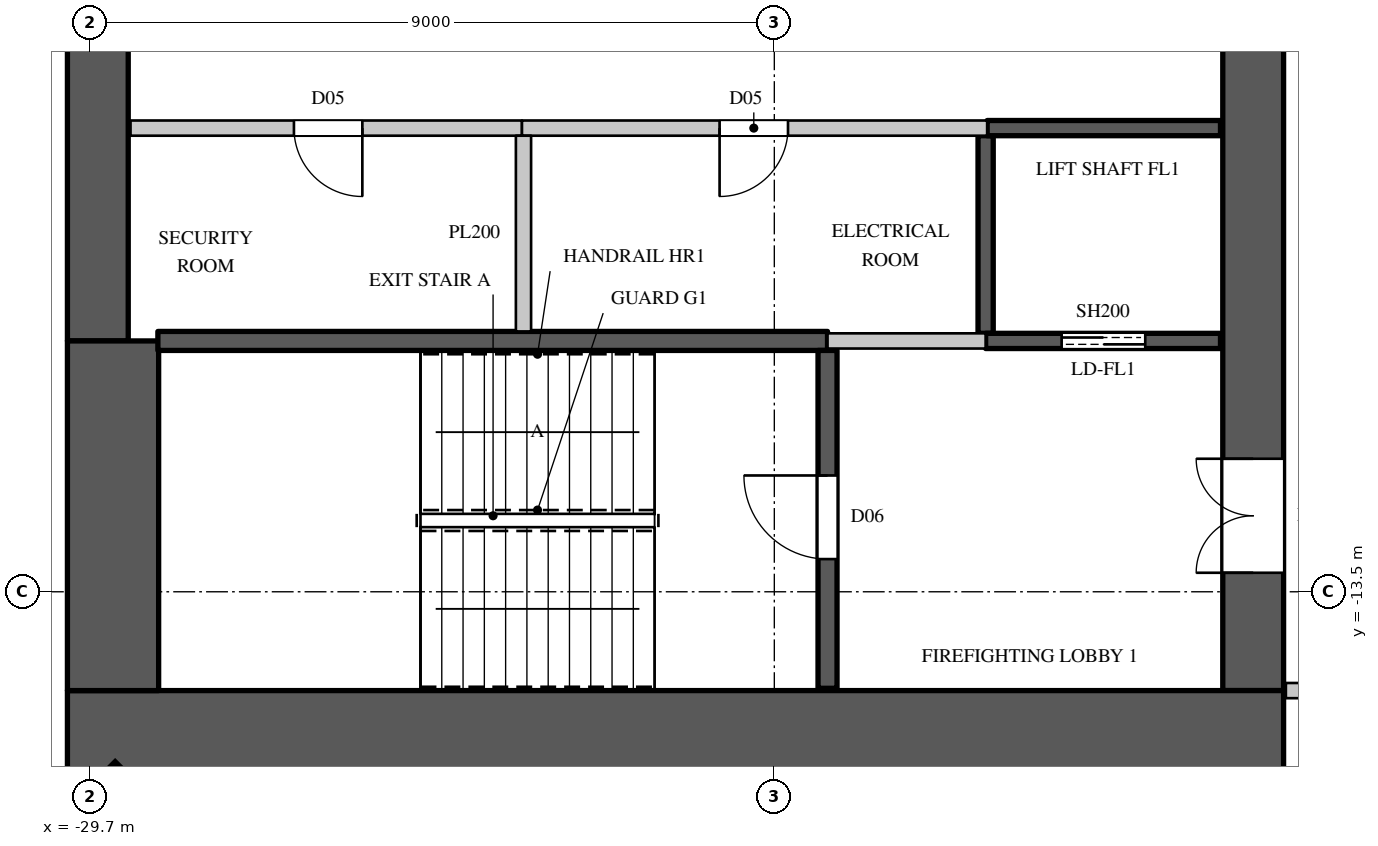
"""IFC4 building model, lengths in metres.
Left out: names, types, materials, properties, quantities, classifications, styles, units other than length and angle.
Written with IfcOpenShell. Run it as: python <this file> out.ifc"""

import sys

from ifc_helpers import new_model, si_unit, direction, frame, frame_2d, origin, origin_2d, place, context, subcontext, project, spatial, rectangle, extrude, element, fill, save


model = new_model("IFC4")
c1 = context("Model", 3, precision=1e-05, world=origin(), true_north=direction((0.0, 1.0)))
c2 = subcontext(c1, "Body", "Model", "MODEL_VIEW")
j1 = project(units=[si_unit("LENGTHUNIT", "METRE"), si_unit("PLANEANGLEUNIT", "RADIAN")], contexts=[c1])
p1 = place(None, origin())
s1 = spatial("IfcSite", under=j1, at=p1, CompositionType="ELEMENT")
p2 = place(p1, origin())
s2 = spatial("IfcBuilding", under=s1, at=p2, CompositionType="ELEMENT")
p3 = place(p2, frame((0.0, 0.0, 189.2)))
s3 = spatial("IfcBuildingStorey", under=s2, at=p3, CompositionType="ELEMENT", Elevation=189.2)
p4 = place(p3, frame((-29.443, -16.443, 0.0), z_axis=(0.0, 0.0, 1.0), x_axis=(0.707106781187, -0.707106781187, 0.0)))
e1 = element("IfcColumn", 1, at=p4, inside=s3, PredefinedType="COLUMN", context=c2, shape_type="SweptSolid", body=[
    extrude(rectangle(XDim=0.9, YDim=1.1, at=origin_2d()), origin(), (0.0, 0.0, 1.0), 4.1),
])
p5 = place(p3, frame((-30.0, -15.4, 0.0), z_axis=(0.0, 0.0, 1.0), x_axis=(1.0, 0.0, 0.0)))
e2 = element("IfcWall", 2, at=p5, inside=s3, PredefinedType="SHEAR", context=c2, shape_type="SweptSolid", body=[
    extrude(rectangle(XDim=16.0, YDim=1.2, at=frame_2d((8.0, 0.0))), origin(), (0.0, 0.0, 1.0), 4.1),
])
p6 = place(p3, frame((-14.4, -14.8, 0.0), z_axis=(0.0, 0.0, 1.0), x_axis=(0.0, 1.0, 0.0)))
e3 = element("IfcWall", 3, at=p6, inside=s3, PredefinedType="SHEAR", context=c2, shape_type="SweptSolid", body=[
    extrude(rectangle(XDim=29.6, YDim=0.8, at=frame_2d((14.8, 0.0))), origin(), (0.0, 0.0, 1.0), 4.1),
])
p7 = place(p6, frame((1.55, 0.0, 0.0)))
e4 = element("IfcOpeningElement", 4, at=p7, cuts=e3, PredefinedType="OPENING", context=c2, shape_type="SweptSolid", body=[
    extrude(rectangle(XDim=1.5, YDim=2.4, at=frame_2d((0.75, 1.2))), frame((0.0, 0.41, 0.0), z_axis=(0.0, -1.0, 0.0), x_axis=(1.0, 0.0, 0.0)), (0.0, 0.0, 1.0), 0.82),
])
p8 = place(p6, frame((26.55, 0.0, 0.0)))
e5 = element("IfcOpeningElement", 5, at=p8, cuts=e3, PredefinedType="OPENING", context=c2, shape_type="SweptSolid", body=[
    extrude(rectangle(XDim=1.5, YDim=2.4, at=frame_2d((0.75, 1.2))), frame((0.0, 0.41, 0.0), z_axis=(0.0, -1.0, 0.0), x_axis=(1.0, 0.0, 0.0)), (0.0, 0.0, 1.0), 0.82),
])
p9 = place(p6, frame((8.45, 0.0, 0.0)))
e6 = element("IfcOpeningElement", 6, at=p9, cuts=e3, PredefinedType="OPENING", context=c2, shape_type="SweptSolid", body=[
    extrude(rectangle(XDim=1.5, YDim=2.4, at=frame_2d((0.75, 1.2))), frame((0.0, 0.41, 0.0), z_axis=(0.0, -1.0, 0.0), x_axis=(1.0, 0.0, 0.0)), (0.0, 0.0, 1.0), 0.82),
])
p10 = place(p6, frame((19.65, 0.0, 0.0)))
e7 = element("IfcOpeningElement", 7, at=p10, cuts=e3, PredefinedType="OPENING", context=c2, shape_type="SweptSolid", body=[
    extrude(rectangle(XDim=1.5, YDim=2.4, at=frame_2d((0.75, 1.2))), frame((0.0, 0.41, 0.0), z_axis=(0.0, -1.0, 0.0), x_axis=(1.0, 0.0, 0.0)), (0.0, 0.0, 1.0), 0.82),
])
p11 = place(p6, frame((14.5, 0.0, 0.0)))
e8 = element("IfcOpeningElement", 8, at=p11, cuts=e3, PredefinedType="OPENING", context=c2, shape_type="SweptSolid", body=[
    extrude(rectangle(XDim=0.6, YDim=2.0, at=frame_2d((0.3, 1.0))), frame((0.0, 0.41, 0.0), z_axis=(0.0, -1.0, 0.0), x_axis=(1.0, 0.0, 0.0)), (0.0, 0.0, 1.0), 0.82),
])
p12 = place(p3, frame((-29.6, -10.2, 0.0), z_axis=(0.0, 0.0, 1.0), x_axis=(0.0, 1.0, 0.0)))
e9 = element("IfcWall", 9, at=p12, inside=s3, PredefinedType="SHEAR", context=c2, shape_type="SweptSolid", body=[
    extrude(rectangle(XDim=20.4, YDim=0.8, at=frame_2d((10.2, 0.0))), origin(), (0.0, 0.0, 1.0), 4.1),
])
p13 = place(p3, frame((-29.4, -14.8, 0.0), z_axis=(0.0, 0.0, 1.0), x_axis=(0.0, 1.0, 0.0)))
e10 = element("IfcWall", 10, at=p13, inside=s3, PredefinedType="SHEAR", context=c2, shape_type="SweptSolid", body=[
    extrude(rectangle(XDim=4.6, YDim=1.2, at=frame_2d((2.3, 0.0))), origin(), (0.0, 0.0, 1.0), 4.1),
])
p14 = place(p3, frame((-29.17, -7.4, 0.0), z_axis=(0.0, 0.0, 1.0), x_axis=(1.0, 0.0, 0.0)))
e11 = element("IfcWall", 11, at=p14, inside=s3, PredefinedType="PARTITIONING", context=c2, shape_type="SweptSolid", body=[
    extrude(rectangle(XDim=5.15, YDim=0.2, at=frame_2d((2.575, 0.0))), origin(), (0.0, 0.0, 1.0), 3.8),
])
p15 = place(p14, frame((2.15, 0.0, 0.0)))
e12 = element("IfcOpeningElement", 12, at=p15, cuts=e11, PredefinedType="OPENING", context=c2, shape_type="SweptSolid", body=[
    extrude(rectangle(XDim=0.9, YDim=2.2, at=frame_2d((0.45, 1.1))), frame((0.0, 0.11, 0.0), z_axis=(0.0, -1.0, 0.0), x_axis=(1.0, 0.0, 0.0)), (0.0, 0.0, 1.0), 0.22),
])
p16 = place(p3, frame((-13.97, -14.8, 0.0), z_axis=(0.0, 0.0, 1.0), x_axis=(1.0, 0.0, 0.0)))
e13 = element("IfcWall", 13, at=p16, inside=s3, PredefinedType="PARTITIONING", context=c2, shape_type="SweptSolid", body=[
    extrude(rectangle(XDim=2.87, YDim=0.2, at=frame_2d((1.435, 0.0))), origin(), (0.0, 0.0, 1.0), 3.8),
])
p17 = place(p3, frame((-24.02, -7.4, 0.0), z_axis=(0.0, 0.0, 1.0), x_axis=(1.0, 0.0, 0.0)))
e14 = element("IfcWall", 14, at=p17, inside=s3, PredefinedType="PARTITIONING", context=c2, shape_type="SweptSolid", body=[
    extrude(rectangle(XDim=6.12, YDim=0.2, at=frame_2d((3.06, 0.0))), origin(), (0.0, 0.0, 1.0), 3.8),
])
p18 = place(p17, frame((2.6, 0.0, 0.0)))
e15 = element("IfcOpeningElement", 15, at=p18, cuts=e14, PredefinedType="OPENING", context=c2, shape_type="SweptSolid", body=[
    extrude(rectangle(XDim=0.9, YDim=2.2, at=frame_2d((0.45, 1.1))), frame((0.0, 0.11, 0.0), z_axis=(0.0, -1.0, 0.0), x_axis=(1.0, 0.0, 0.0)), (0.0, 0.0, 1.0), 0.22),
])
p19 = place(p3, frame((-24.0, -10.075, 0.0), z_axis=(0.0, 0.0, 1.0), x_axis=(0.0, 1.0, 0.0)))
e16 = element("IfcWall", 16, at=p19, inside=s3, PredefinedType="PARTITIONING", context=c2, shape_type="SweptSolid", body=[
    extrude(rectangle(XDim=2.575, YDim=0.2, at=frame_2d((1.288, 0.0))), origin(), (0.0, 0.0, 1.0), 3.8),
])
p20 = place(p3, frame((-20.0, -10.2, 0.0), z_axis=(0.0, 0.0, 1.0), x_axis=(1.0, 0.0, 0.0)))
e17 = element("IfcWall", 17, at=p20, inside=s3, PredefinedType="PARTITIONING", context=c2, shape_type="SweptSolid", body=[
    extrude(rectangle(XDim=2.08, YDim=0.2, at=frame_2d((1.04, 0.0))), origin(), (0.0, 0.0, 1.0), 3.8),
])
p21 = place(p3, frame((-17.92, -10.1, 0.0), z_axis=(0.0, 0.0, 1.0), x_axis=(0.0, 1.0, 0.0)))
e18 = element("IfcWall", 18, at=p21, inside=s3, PredefinedType="SHEAR", context=c2, shape_type="SweptSolid", body=[
    extrude(rectangle(XDim=2.6, YDim=0.2, at=frame_2d((1.3, 0.0))), origin(), (0.0, 0.0, 1.0), 3.8),
])
p22 = place(p3, frame((-17.92, -10.2, 0.0), z_axis=(0.0, 0.0, 1.0), x_axis=(1.0, 0.0, 0.0)))
e19 = element("IfcWall", 19, at=p22, inside=s3, PredefinedType="SHEAR", context=c2, shape_type="SweptSolid", body=[
    extrude(rectangle(XDim=3.09, YDim=0.2, at=frame_2d((1.545, 0.0))), origin(), (0.0, 0.0, 1.0), 3.8),
])
p23 = place(p22, frame((1.0, 0.0, 0.0)))
e20 = element("IfcOpeningElement", 20, at=p23, cuts=e19, PredefinedType="OPENING", context=c2, shape_type="SweptSolid", body=[
    extrude(rectangle(XDim=1.1, YDim=2.2, at=frame_2d((0.55, 1.1))), frame((0.0, 0.11, 0.0), z_axis=(0.0, -1.0, 0.0), x_axis=(1.0, 0.0, 0.0)), (0.0, 0.0, 1.0), 0.22),
])
p24 = place(p3, frame((-17.9, -7.4, 0.0), z_axis=(0.0, 0.0, 1.0), x_axis=(1.0, 0.0, 0.0)))
e21 = element("IfcWall", 21, at=p24, inside=s3, PredefinedType="SHEAR", context=c2, shape_type="SweptSolid", body=[
    extrude(rectangle(XDim=3.07, YDim=0.2, at=frame_2d((1.535, 0.0))), origin(), (0.0, 0.0, 1.0), 3.8),
])
p25 = place(p3, frame((-28.81, -10.2, 0.0), z_axis=(0.0, 0.0, 1.0), x_axis=(1.0, 0.0, 0.0)))
e22 = element("IfcWall", 22, at=p25, inside=s3, PredefinedType="SHEAR", context=c2, shape_type="SweptSolid", body=[
    extrude(rectangle(XDim=8.81, YDim=0.25, at=frame_2d((4.405, 0.0))), origin(), (0.0, 0.0, 1.0), 3.8),
])
p26 = place(p3, frame((-20.0, -14.77, 0.0), z_axis=(0.0, 0.0, 1.0), x_axis=(0.0, 1.0, 0.0)))
e23 = element("IfcWall", 23, at=p26, inside=s3, PredefinedType="SHEAR", context=c2, shape_type="SweptSolid", body=[
    extrude(rectangle(XDim=4.445, YDim=0.25, at=frame_2d((2.223, 0.0))), origin(), (0.0, 0.0, 1.0), 3.8),
])
p27 = place(p26, frame((1.7, 0.0, 0.0)))
e24 = element("IfcOpeningElement", 24, at=p27, cuts=e23, PredefinedType="OPENING", context=c2, shape_type="SweptSolid", body=[
    extrude(rectangle(XDim=1.1, YDim=2.2, at=frame_2d((0.55, 1.1))), frame((0.0, 0.135, 0.0), z_axis=(0.0, -1.0, 0.0), x_axis=(1.0, 0.0, 0.0)), (0.0, 0.0, 1.0), 0.27),
])
p28 = place(p27, origin())
e25 = element("IfcDoor", 25, at=p28, inside=s3, OperationType="SINGLE_SWING_RIGHT", PredefinedType="DOOR", context=c2, shape_type="SweptSolid", body=[
    extrude(rectangle(XDim=1.1, YDim=2.2, at=frame_2d((0.55, 1.1))), frame((0.0, 0.025, 0.0), z_axis=(0.0, -1.0, 0.0), x_axis=(1.0, 0.0, 0.0)), (0.0, 0.0, 1.0), 0.05),
])
fill(e24, e25)
p29 = place(p15, origin())
e26 = element("IfcDoor", 26, at=p29, inside=s3, OperationType="SINGLE_SWING_LEFT", PredefinedType="DOOR", context=c2, shape_type="SweptSolid", body=[
    extrude(rectangle(XDim=0.9, YDim=2.2, at=frame_2d((0.45, 1.1))), frame((0.0, 0.025, 0.0), z_axis=(0.0, -1.0, 0.0), x_axis=(1.0, 0.0, 0.0)), (0.0, 0.0, 1.0), 0.05),
])
fill(e12, e26)
p30 = place(p18, origin())
e27 = element("IfcDoor", 27, at=p30, inside=s3, OperationType="SINGLE_SWING_RIGHT", PredefinedType="DOOR", context=c2, shape_type="SweptSolid", body=[
    extrude(rectangle(XDim=0.9, YDim=2.2, at=frame_2d((0.45, 1.1))), frame((0.0, 0.025, 0.0), z_axis=(0.0, -1.0, 0.0), x_axis=(1.0, 0.0, 0.0)), (0.0, 0.0, 1.0), 0.05),
])
fill(e15, e27)
p31 = place(p23, origin())
e28 = element("IfcDoor", 28, at=p31, inside=s3, OperationType="DOUBLE_DOOR_SLIDING", PredefinedType="DOOR", context=c2, shape_type="SweptSolid", body=[
    extrude(rectangle(XDim=1.1, YDim=2.2, at=frame_2d((0.55, 1.1))), frame((0.0, 0.025, 0.0), z_axis=(0.0, -1.0, 0.0), x_axis=(1.0, 0.0, 0.0)), (0.0, 0.0, 1.0), 0.05),
])
fill(e20, e28)
p32 = place(p7, origin())
e29 = element("IfcDoor", 29, at=p32, inside=s3, OperationType="DOUBLE_DOOR_SINGLE_SWING", PredefinedType="DOOR", context=c2, shape_type="SweptSolid", body=[
    extrude(rectangle(XDim=1.5, YDim=2.4, at=frame_2d((0.75, 1.2))), frame((0.0, 0.395, 0.0), z_axis=(0.0, -1.0, 0.0), x_axis=(1.0, 0.0, 0.0)), (0.0, 0.0, 1.0), 0.05),
])
fill(e4, e29)
save(model, sys.argv[1])
